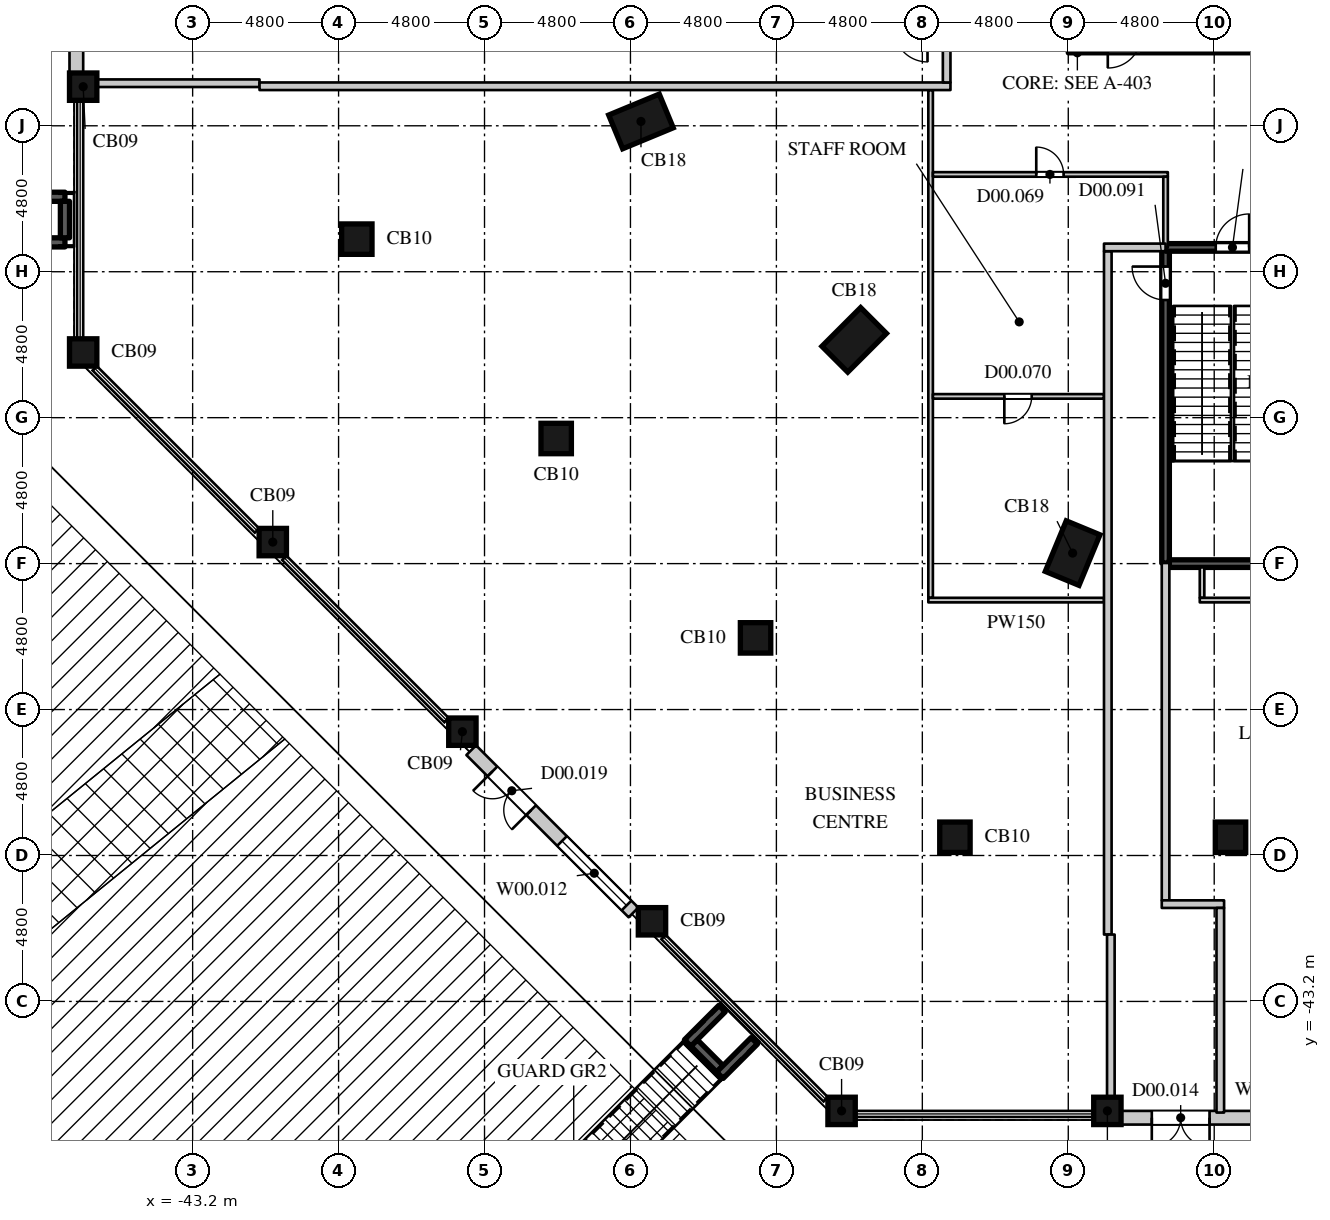
"""IFC4 building model, lengths in metres.
Left out: names, types, materials, properties, quantities, classifications, styles, units other than length and angle.
Written with IfcOpenShell. Run it as: python <this file> out.ifc"""

import sys

from ifc_helpers import new_model, si_unit, direction, frame, frame_2d, origin, origin_2d, place, context, subcontext, project, spatial, rectangle, extrude, element, fill, save


model = new_model("IFC4")
c1 = context("Model", 3, precision=1e-05, world=origin(), true_north=direction((0.0, 1.0)))
c2 = subcontext(c1, "Body", "Model", "MODEL_VIEW")
j1 = project(units=[si_unit("LENGTHUNIT", "METRE"), si_unit("PLANEANGLEUNIT", "RADIAN")], contexts=[c1])
p1 = place(None, origin())
s1 = spatial("IfcSite", under=j1, at=p1, CompositionType="ELEMENT")
p2 = place(p1, origin())
s2 = spatial("IfcBuilding", under=s1, at=p2, CompositionType="ELEMENT")
p3 = place(p2, origin())
s3 = spatial("IfcBuildingStorey", under=s2, at=p3, CompositionType="ELEMENT", Elevation=0.0)
for number, where, z_axis, x_axis in (
    (1, (-21.856, -46.8, 0.0), (0.0, 0.0, 1.0), (1.0, 0.0, 0.0)),
    (2, (-13.114, -46.8, 0.0), (0.0, 0.0, 1.0), (1.0, 0.0, 0.0)),
    (3, (-28.092, -40.564, 0.0), (0.0, 0.0, 1.0), (1.0, 0.0, 0.0)),
):
    element("IfcColumn", number, at=place(p3, frame(where, z_axis=z_axis, x_axis=x_axis)), inside=s3, PredefinedType="COLUMN", context=c2, shape_type="SweptSolid", body=[
        extrude(rectangle(XDim=0.9, YDim=0.9, at=origin_2d()), origin(), (0.0, 0.0, 1.0), 6.0),
    ])
for number, where, z_axis, x_axis in (
    (4, (-18.128, -37.8, 0.0), (0.0, 0.0, 1.0), (1.0, 0.0, 0.0)),
    (5, (-9.064, -37.8, 0.0), (0.0, 0.0, 1.0), (1.0, 0.0, 0.0)),
):
    element("IfcColumn", number, at=place(p3, frame(where, z_axis=z_axis, x_axis=x_axis)), inside=s3, PredefinedType="COLUMN", context=c2, shape_type="SweptSolid", body=[
        extrude(rectangle(XDim=1.0, YDim=1.0, at=origin_2d()), origin(), (0.0, 0.0, 1.0), 6.0),
    ])
p4 = place(p3, frame((-34.328, -34.328, 0.0), z_axis=(0.0, 0.0, 1.0), x_axis=(1.0, 0.0, 0.0)))
e6 = element("IfcColumn", 6, at=p4, inside=s3, PredefinedType="COLUMN", context=c2, shape_type="SweptSolid", body=[
    extrude(rectangle(XDim=0.9, YDim=0.9, at=origin_2d()), origin(), (0.0, 0.0, 1.0), 6.0),
])
p5 = place(p3, frame((-24.685, -31.243, 0.0), z_axis=(0.0, 0.0, 1.0), x_axis=(1.0, 0.0, 0.0)))
e7 = element("IfcColumn", 7, at=p5, inside=s3, PredefinedType="COLUMN", context=c2, shape_type="SweptSolid", body=[
    extrude(rectangle(XDim=1.0, YDim=1.0, at=origin_2d()), origin(), (0.0, 0.0, 1.0), 6.0),
])
p6 = place(p3, frame((-14.257, -28.454, 0.0), z_axis=(0.0, 0.0, 1.0), x_axis=(0.923879505795, -0.382683496864, 0.0)))
e8 = element("IfcColumn", 8, at=p6, inside=s3, PredefinedType="COLUMN", context=c2, shape_type="SweptSolid", body=[
    extrude(rectangle(XDim=1.2, YDim=1.8, at=origin_2d()), origin(), (0.0, 0.0, 1.0), 6.0),
])
p7 = place(p3, frame((-40.564, -28.092, 0.0), z_axis=(0.0, 0.0, 1.0), x_axis=(1.0, 0.0, 0.0)))
e9 = element("IfcColumn", 9, at=p7, inside=s3, PredefinedType="COLUMN", context=c2, shape_type="SweptSolid", body=[
    extrude(rectangle(XDim=0.9, YDim=0.9, at=origin_2d()), origin(), (0.0, 0.0, 1.0), 6.0),
])
p8 = place(p3, frame((-31.243, -24.685, 0.0), z_axis=(0.0, 0.0, 1.0), x_axis=(1.0, 0.0, 0.0)))
e10 = element("IfcColumn", 10, at=p8, inside=s3, PredefinedType="COLUMN", context=c2, shape_type="SweptSolid", body=[
    extrude(rectangle(XDim=1.0, YDim=1.0, at=origin_2d()), origin(), (0.0, 0.0, 1.0), 6.0),
])
p9 = place(p3, frame((-46.8, -21.856, 0.0), z_axis=(0.0, 0.0, 1.0), x_axis=(1.0, 0.0, 0.0)))
e11 = element("IfcColumn", 11, at=p9, inside=s3, PredefinedType="COLUMN", context=c2, shape_type="SweptSolid", body=[
    extrude(rectangle(XDim=0.9, YDim=0.9, at=origin_2d()), origin(), (0.0, 0.0, 1.0), 6.0),
])
p10 = place(p3, frame((-21.441, -21.441, 0.0), z_axis=(0.0, 0.0, 1.0), x_axis=(0.707106781187, -0.707106781187, 0.0)))
e12 = element("IfcColumn", 12, at=p10, inside=s3, PredefinedType="COLUMN", context=c2, shape_type="SweptSolid", body=[
    extrude(rectangle(XDim=1.2, YDim=1.8, at=origin_2d()), origin(), (0.0, 0.0, 1.0), 6.0),
])
p11 = place(p3, frame((-37.8, -18.128, 0.0), z_axis=(0.0, 0.0, 1.0), x_axis=(1.0, 0.0, 0.0)))
e13 = element("IfcColumn", 13, at=p11, inside=s3, PredefinedType="COLUMN", context=c2, shape_type="SweptSolid", body=[
    extrude(rectangle(XDim=1.0, YDim=1.0, at=origin_2d()), origin(), (0.0, 0.0, 1.0), 6.0),
])
p12 = place(p3, frame((-28.454, -14.257, 0.0), z_axis=(0.0, 0.0, 1.0), x_axis=(0.382683496864, -0.923879505795, 0.0)))
e14 = element("IfcColumn", 14, at=p12, inside=s3, PredefinedType="COLUMN", context=c2, shape_type="SweptSolid", body=[
    extrude(rectangle(XDim=1.2, YDim=1.8, at=origin_2d()), origin(), (0.0, 0.0, 1.0), 6.0),
])
p13 = place(p3, frame((-46.8, -13.114, 0.0), z_axis=(0.0, 0.0, 1.0), x_axis=(1.0, 0.0, 0.0)))
e15 = element("IfcColumn", 15, at=p13, inside=s3, PredefinedType="COLUMN", context=c2, shape_type="SweptSolid", body=[
    extrude(rectangle(XDim=0.9, YDim=0.9, at=origin_2d()), origin(), (0.0, 0.0, 1.0), 6.0),
])
p14 = place(p3, frame((-47.025, -4.821, 0.0), z_axis=(0.0, 0.0, 1.0), x_axis=(0.0, -1.0, 0.0)))
e16 = element("IfcWall", 16, at=p14, inside=s3, PredefinedType="ELEMENTEDWALL", context=c2, shape_type="SweptSolid", body=[
    extrude(rectangle(XDim=7.842, YDim=0.45, at=frame_2d((3.921, 0.0))), origin(), (0.0, 0.0, 1.0), 4.8),
])
p15 = place(p14, frame((1.061, 0.0, 0.0)))
e17 = element("IfcOpeningElement", 17, at=p15, cuts=e16, PredefinedType="OPENING", context=c2, shape_type="SweptSolid", body=[
    extrude(rectangle(XDim=1.8, YDim=2.7, at=frame_2d((0.9, 1.35))), frame((0.0, 0.235, 0.0), z_axis=(0.0, -1.0, 0.0), x_axis=(1.0, 0.0, 0.0)), (0.0, 0.0, 1.0), 0.47),
])
p16 = place(p14, frame((5.157, 0.0, 0.0)))
e18 = element("IfcOpeningElement", 18, at=p16, cuts=e16, PredefinedType="OPENING", context=c2, shape_type="SweptSolid", body=[
    extrude(rectangle(XDim=1.9, YDim=2.7, at=frame_2d((0.95, 1.35))), frame((0.0, 0.235, 0.0), z_axis=(0.0, -1.0, 0.0), x_axis=(1.0, 0.0, 0.0)), (0.0, 0.0, 1.0), 0.47),
])
p17 = place(p3, frame((-34.037, -34.937, 0.0), z_axis=(0.0, 0.0, 1.0), x_axis=(0.707122957123, -0.70709060488, 0.0)))
e19 = element("IfcWall", 19, at=p17, inside=s3, PredefinedType="ELEMENTEDWALL", context=c2, shape_type="SweptSolid", body=[
    extrude(rectangle(XDim=7.546, YDim=0.45, at=frame_2d((3.773, 0.0))), origin(), (0.0, 0.0, 1.0), 4.8),
])
p18 = place(p17, frame((0.987, 0.0, 0.0)))
e20 = element("IfcOpeningElement", 20, at=p18, cuts=e19, PredefinedType="OPENING", context=c2, shape_type="SweptSolid", body=[
    extrude(rectangle(XDim=1.8, YDim=2.7, at=frame_2d((0.9, 1.35))), frame((0.0, 0.235, 0.0), z_axis=(0.0, -1.0, 0.0), x_axis=(1.0, 0.0, 0.0)), (0.0, 0.0, 1.0), 0.47),
])
p19 = place(p17, frame((4.223, 0.0, 1.05)))
e21 = element("IfcOpeningElement", 21, at=p19, cuts=e19, PredefinedType="OPENING", context=c2, shape_type="SweptSolid", body=[
    extrude(rectangle(XDim=3.0, YDim=2.7, at=frame_2d((1.5, 1.35))), frame((0.0, 0.235, 0.0), z_axis=(0.0, -1.0, 0.0), x_axis=(1.0, 0.0, 0.0)), (0.0, 0.0, 1.0), 0.47),
])
p20 = place(p3, frame((-12.664, -47.025, 0.0), z_axis=(0.0, 0.0, 1.0), x_axis=(1.0, 0.0, 0.0)))
e22 = element("IfcWall", 22, at=p20, inside=s3, PredefinedType="ELEMENTEDWALL", context=c2, shape_type="SweptSolid", body=[
    extrude(rectangle(XDim=7.842, YDim=0.45, at=frame_2d((3.921, 0.0))), origin(), (0.0, 0.0, 1.0), 4.8),
])
p21 = place(p20, frame((1.01, 0.0, 0.0)))
e23 = element("IfcOpeningElement", 23, at=p21, cuts=e22, PredefinedType="OPENING", context=c2, shape_type="SweptSolid", body=[
    extrude(rectangle(XDim=1.9, YDim=2.7, at=frame_2d((0.95, 1.35))), frame((0.0, 0.235, 0.0), z_axis=(0.0, -1.0, 0.0), x_axis=(1.0, 0.0, 0.0)), (0.0, 0.0, 1.0), 0.47),
])
p22 = place(p20, frame((4.371, 0.0, 1.05)))
e24 = element("IfcOpeningElement", 24, at=p22, cuts=e22, PredefinedType="OPENING", context=c2, shape_type="SweptSolid", body=[
    extrude(rectangle(XDim=1.09, YDim=2.7, at=frame_2d((0.545, 1.35))), frame((0.0, 0.235, 0.0), z_axis=(0.0, -1.0, 0.0), x_axis=(1.0, 0.0, 0.0)), (0.0, 0.0, 1.0), 0.47),
])
p23 = place(p20, frame((5.864, 0.0, 1.05)))
e25 = element("IfcOpeningElement", 25, at=p23, cuts=e22, PredefinedType="OPENING", context=c2, shape_type="SweptSolid", body=[
    extrude(rectangle(XDim=1.51, YDim=2.7, at=frame_2d((0.755, 1.35))), frame((0.0, 0.235, 0.0), z_axis=(0.0, -1.0, 0.0), x_axis=(1.0, 0.0, 0.0)), (0.0, 0.0, 1.0), 0.47),
])
for number, where, z_axis, x_axis in (
    (26, (-25.787, -43.435, 0.0), (0.0, 0.0, 1.0), (-0.707, -0.707, 0.0)),
    (27, (-24.726, -44.495, 0.0), (0.0, 0.0, 1.0), (-0.707, -0.707, 0.0)),
):
    element("IfcWall", number, at=place(p3, frame(where, z_axis=z_axis, x_axis=x_axis)), inside=s3, PredefinedType="SOLIDWALL", context=c2, shape_type="SweptSolid", body=[
        extrude(rectangle(XDim=1.6, YDim=0.3, at=frame_2d((0.8, 0.0))), origin(), (0.0, 0.0, 1.0), 5.8),
    ])
p24 = place(p3, frame((-26.706, -44.566, 0.0), z_axis=(0.0, 0.0, 1.0), x_axis=(0.707208501214, -0.707005046524, 0.0)))
e28 = element("IfcWall", 28, at=p24, inside=s3, PredefinedType="SOLIDWALL", context=c2, shape_type="SweptSolid", body=[
    extrude(rectangle(XDim=1.2, YDim=0.3, at=frame_2d((0.6, 0.0))), origin(), (0.0, 0.0, 1.0), 5.8),
])
p25 = place(p3, frame((-18.928, -29.925, 0.0), z_axis=(0.0, 0.0, 1.0), x_axis=(0.0, 1.0, 0.0)))
e29 = element("IfcWall", 29, at=p25, inside=s3, PredefinedType="PARTITIONING", context=c2, shape_type="SweptSolid", body=[
    extrude(rectangle(XDim=16.7, YDim=0.15, at=frame_2d((8.35, 0.0))), origin(), (0.0, 0.0, 1.0), 5.65),
])
p26 = place(p3, frame((-19.003, -30.0, 0.0), z_axis=(0.0, 0.0, 1.0), x_axis=(1.0, 0.0, 0.0)))
e30 = element("IfcWall", 30, at=p26, inside=s3, PredefinedType="PARTITIONING", context=c2, shape_type="SweptSolid", body=[
    extrude(rectangle(XDim=5.778, YDim=0.15, at=frame_2d((2.889, 0.0))), origin(), (0.0, 0.0, 1.0), 5.65),
])
p27 = place(p3, frame((-18.853, -23.3, 0.0), z_axis=(0.0, 0.0, 1.0), x_axis=(1.0, 0.0, 0.0)))
e31 = element("IfcWall", 31, at=p27, inside=s3, PredefinedType="PARTITIONING", context=c2, shape_type="SweptSolid", body=[
    extrude(rectangle(XDim=5.628, YDim=0.15, at=frame_2d((2.814, 0.0))), origin(), (0.0, 0.0, 1.0), 5.65),
])
p28 = place(p27, frame((2.35, 0.0, 0.0)))
e32 = element("IfcOpeningElement", 32, at=p28, cuts=e31, PredefinedType="OPENING", context=c2, shape_type="SweptSolid", body=[
    extrude(rectangle(XDim=0.9, YDim=2.2, at=frame_2d((0.45, 1.1))), frame((0.0, 0.085, 0.0), z_axis=(0.0, -1.0, 0.0), x_axis=(1.0, 0.0, 0.0)), (0.0, 0.0, 1.0), 0.17),
])
p29 = place(p3, frame((-18.853, -16.0, 0.0), z_axis=(0.0, 0.0, 1.0), x_axis=(1.0, 0.0, 0.0)))
e33 = element("IfcWall", 33, at=p29, inside=s3, PredefinedType="PARTITIONING", context=c2, shape_type="SweptSolid", body=[
    extrude(rectangle(XDim=7.728, YDim=0.15, at=frame_2d((3.864, 0.0))), origin(), (0.0, 0.0, 1.0), 5.65),
])
p30 = place(p29, frame((3.4, 0.0, 0.0)))
e34 = element("IfcOpeningElement", 34, at=p30, cuts=e33, PredefinedType="OPENING", context=c2, shape_type="SweptSolid", body=[
    extrude(rectangle(XDim=0.9, YDim=2.2, at=frame_2d((0.45, 1.1))), frame((0.0, 0.085, 0.0), z_axis=(0.0, -1.0, 0.0), x_axis=(1.0, 0.0, 0.0)), (0.0, 0.0, 1.0), 0.17),
])
p31 = place(p3, frame((-11.2, -18.4, 0.0), z_axis=(0.0, 0.0, 1.0), x_axis=(0.0, 1.0, 0.0)))
e35 = element("IfcWall", 35, at=p31, inside=s3, PredefinedType="PARTITIONING", context=c2, shape_type="SweptSolid", body=[
    extrude(rectangle(XDim=2.325, YDim=0.15, at=frame_2d((1.163, 0.0))), origin(), (0.0, 0.0, 1.0), 5.65),
])
p32 = place(p3, frame((-10.0, -29.925, 0.0), z_axis=(0.0, 0.0, 1.0), x_axis=(0.0, 1.0, 0.0)))
e36 = element("IfcWall", 36, at=p32, inside=s3, PredefinedType="PARTITIONING", context=c2, shape_type="SweptSolid", body=[
    extrude(rectangle(XDim=1.0, YDim=0.15, at=frame_2d((0.5, 0.0))), origin(), (0.0, 0.0, 1.0), 5.65),
])
p33 = place(p3, frame((-10.075, -30.0, 0.0), z_axis=(0.0, 0.0, 1.0), x_axis=(1.0, 0.0, 0.0)))
e37 = element("IfcWall", 37, at=p33, inside=s3, PredefinedType="PARTITIONING", context=c2, shape_type="SweptSolid", body=[
    extrude(rectangle(XDim=7.675, YDim=0.15, at=frame_2d((3.837, 0.0))), origin(), (0.0, 0.0, 1.0), 5.65),
])
p34 = place(p3, frame((-11.2, -28.78, 0.0), z_axis=(0.0, 0.0, 1.0), x_axis=(0.0, 1.0, 0.0)))
e38 = element("IfcWall", 38, at=p34, inside=s3, PredefinedType="SHEAR", context=c2, shape_type="SweptSolid", body=[
    extrude(rectangle(XDim=10.38, YDim=0.25, at=frame_2d((5.19, 0.0))), origin(), (0.0, 0.0, 1.0), 5.65),
])
p35 = place(p34, frame((8.65, 0.0, 0.0)))
e39 = element("IfcOpeningElement", 39, at=p35, cuts=e38, PredefinedType="OPENING", context=c2, shape_type="SweptSolid", body=[
    extrude(rectangle(XDim=1.1, YDim=2.2, at=frame_2d((0.55, 1.1))), frame((0.0, 0.135, 0.0), z_axis=(0.0, -1.0, 0.0), x_axis=(1.0, 0.0, 0.0)), (0.0, 0.0, 1.0), 0.27),
])
p36 = place(p3, frame((-11.075, -28.8, 0.0), z_axis=(0.0, 0.0, 1.0), x_axis=(1.0, 0.0, 0.0)))
e40 = element("IfcWall", 40, at=p36, inside=s3, PredefinedType="SHEAR", context=c2, shape_type="SweptSolid", body=[
    extrude(rectangle(XDim=4.4, YDim=0.25, at=frame_2d((2.2, 0.0))), origin(), (0.0, 0.0, 1.0), 5.65),
])
p37 = place(p3, frame((-11.2, -18.4, 0.0), z_axis=(0.0, 0.0, 1.0), x_axis=(1.0, 0.0, 0.0)))
e41 = element("IfcWall", 41, at=p37, inside=s3, PredefinedType="SHEAR", context=c2, shape_type="SweptSolid", body=[
    extrude(rectangle(XDim=4.275, YDim=0.25, at=frame_2d((2.137, 0.0))), origin(), (0.0, 0.0, 1.0), 5.65),
])
p38 = place(p37, frame((1.65, 0.0, 0.0)))
e42 = element("IfcOpeningElement", 42, at=p38, cuts=e41, PredefinedType="OPENING", context=c2, shape_type="SweptSolid", body=[
    extrude(rectangle(XDim=1.1, YDim=2.2, at=frame_2d((0.55, 1.1))), frame((0.0, 0.135, 0.0), z_axis=(0.0, -1.0, 0.0), x_axis=(1.0, 0.0, 0.0)), (0.0, 0.0, 1.0), 0.27),
])
p39 = place(p3, frame((-46.35, -13.0, 0.0), z_axis=(0.0, 0.0, 1.0), x_axis=(1.0, 0.0, 0.0)))
e43 = element("IfcWall", 43, at=p39, inside=s3, PredefinedType="PARTITIONING", context=c2, shape_type="SweptSolid", body=[
    extrude(rectangle(XDim=5.35, YDim=0.25, at=frame_2d((2.675, 0.0))), origin(), (0.0, 0.0, 1.0), 5.65),
])
p40 = place(p3, frame((-41.0, -13.1, 0.0), z_axis=(0.0, 0.0, 1.0), x_axis=(1.0, 0.0, 0.0)))
e44 = element("IfcWall", 44, at=p40, inside=s3, PredefinedType="PARTITIONING", context=c2, shape_type="SweptSolid", body=[
    extrude(rectangle(XDim=22.725, YDim=0.25, at=frame_2d((11.363, 0.0))), origin(), (0.0, 0.0, 1.0), 5.65),
])
p41 = place(p3, frame((-18.4, -12.975, 0.0), z_axis=(0.0, 0.0, 1.0), x_axis=(0.0, 1.0, 0.0)))
e45 = element("IfcWall", 45, at=p41, inside=s3, PredefinedType="PARTITIONING", context=c2, shape_type="SweptSolid", body=[
    extrude(rectangle(XDim=1.775, YDim=0.25, at=frame_2d((0.888, 0.0))), origin(), (0.0, 0.0, 1.0), 5.65),
])
p42 = place(p3, frame((-13.1, -41.0, 0.0), z_axis=(0.0, 0.0, 1.0), x_axis=(0.0, 1.0, 0.0)))
e46 = element("IfcWall", 46, at=p42, inside=s3, PredefinedType="PARTITIONING", context=c2, shape_type="SweptSolid", body=[
    extrude(rectangle(XDim=22.475, YDim=0.25, at=frame_2d((11.238, 0.0))), origin(), (0.0, 0.0, 1.0), 5.65),
])
p43 = place(p3, frame((-13.225, -18.4, 0.0), z_axis=(0.0, 0.0, 1.0), x_axis=(1.0, 0.0, 0.0)))
e47 = element("IfcWall", 47, at=p43, inside=s3, PredefinedType="PARTITIONING", context=c2, shape_type="SweptSolid", body=[
    extrude(rectangle(XDim=2.025, YDim=0.25, at=frame_2d((1.013, 0.0))), origin(), (0.0, 0.0, 1.0), 5.65),
])
p44 = place(p3, frame((-13.0, -46.35, 0.0), z_axis=(0.0, 0.0, 1.0), x_axis=(0.0, 1.0, 0.0)))
e48 = element("IfcWall", 48, at=p44, inside=s3, PredefinedType="PARTITIONING", context=c2, shape_type="SweptSolid", body=[
    extrude(rectangle(XDim=5.35, YDim=0.25, at=frame_2d((2.675, 0.0))), origin(), (0.0, 0.0, 1.0), 5.65),
])
p45 = place(p3, frame((-11.2, -39.875, 0.0), z_axis=(0.0, 0.0, 1.0), x_axis=(0.0, 1.0, 0.0)))
e49 = element("IfcWall", 49, at=p45, inside=s3, PredefinedType="PARTITIONING", context=c2, shape_type="SweptSolid", body=[
    extrude(rectangle(XDim=11.095, YDim=0.25, at=frame_2d((5.547, 0.0))), origin(), (0.0, 0.0, 1.0), 5.65),
])
p46 = place(p3, frame((-11.325, -40.0, 0.0), z_axis=(0.0, 0.0, 1.0), x_axis=(1.0, 0.0, 0.0)))
e50 = element("IfcWall", 50, at=p46, inside=s3, PredefinedType="PARTITIONING", context=c2, shape_type="SweptSolid", body=[
    extrude(rectangle(XDim=2.05, YDim=0.25, at=frame_2d((1.025, 0.0))), origin(), (0.0, 0.0, 1.0), 5.65),
])
p47 = place(p3, frame((-9.4, -46.855, 0.0), z_axis=(0.0, 0.0, 1.0), x_axis=(0.0, 1.0, 0.0)))
e51 = element("IfcWall", 51, at=p47, inside=s3, PredefinedType="PARTITIONING", context=c2, shape_type="SweptSolid", body=[
    extrude(rectangle(XDim=6.73, YDim=0.25, at=frame_2d((3.365, 0.0))), origin(), (0.0, 0.0, 1.0), 5.65),
])
for number, where, z_axis, x_axis in (
    (52, (-47.4, -16.735, 0.0), (0.0, 0.0, 1.0), (-1.0, 0.0, 0.0)),
    (53, (-47.4, -18.235, 0.0), (0.0, 0.0, 1.0), (-1.0, 0.0, 0.0)),
):
    element("IfcWall", number, at=place(p3, frame(where, z_axis=z_axis, x_axis=x_axis)), inside=s3, PredefinedType="SOLIDWALL", context=c2, shape_type="SweptSolid", body=[
        extrude(rectangle(XDim=1.35, YDim=0.3, at=frame_2d((0.675, 0.0))), origin(), (0.0, 0.0, 1.0), 5.8),
    ])
p48 = place(p3, frame((-47.4, -16.885, 0.0), z_axis=(0.0, 0.0, 1.0), x_axis=(0.0, -1.0, 0.0)))
e54 = element("IfcWall", 54, at=p48, inside=s3, PredefinedType="SOLIDWALL", context=c2, shape_type="SweptSolid", body=[
    extrude(rectangle(XDim=1.2, YDim=0.3, at=frame_2d((0.6, 0.0))), origin(), (0.0, 0.0, 1.0), 5.8),
])
p49 = place(p18, frame((1.8, 0.0, 0.0), z_axis=(0.0, 0.0, 1.0), x_axis=(-1.0, 0.0, 0.0)))
e55 = element("IfcDoor", 55, at=p49, inside=s3, OperationType="DOUBLE_DOOR_SINGLE_SWING", PredefinedType="DOOR", context=c2, shape_type="SweptSolid", body=[
    extrude(rectangle(XDim=1.8, YDim=2.7, at=frame_2d((0.9, 1.35))), frame((0.0, -0.08, 0.0), z_axis=(0.0, -1.0, 0.0), x_axis=(1.0, 0.0, 0.0)), (0.0, 0.0, 1.0), 0.05),
])
fill(e20, e55)
p50 = place(p19, origin())
e56 = element("IfcWindow", 56, at=p50, inside=s3, PartitioningType="SINGLE_PANEL", PredefinedType="WINDOW", context=c2, shape_type="SweptSolid", body=[
    extrude(rectangle(XDim=3.0, YDim=2.7, at=frame_2d((1.5, 1.35))), frame((0.0, 0.135, 0.0), z_axis=(0.0, -1.0, 0.0), x_axis=(1.0, 0.0, 0.0)), (0.0, 0.0, 1.0), 0.06),
])
fill(e21, e56)
p51 = place(p21, frame((1.9, 0.0, 0.0), z_axis=(0.0, 0.0, 1.0), x_axis=(-1.0, 0.0, 0.0)))
e57 = element("IfcDoor", 57, at=p51, inside=s3, OperationType="DOUBLE_DOOR_SINGLE_SWING", PredefinedType="DOOR", context=c2, shape_type="SweptSolid", body=[
    extrude(rectangle(XDim=1.9, YDim=2.7, at=frame_2d((0.95, 1.35))), frame((0.0, -0.08, 0.0), z_axis=(0.0, -1.0, 0.0), x_axis=(1.0, 0.0, 0.0)), (0.0, 0.0, 1.0), 0.05),
])
fill(e23, e57)
p52 = place(p30, origin())
e58 = element("IfcDoor", 58, at=p52, inside=s3, OperationType="SINGLE_SWING_LEFT", PredefinedType="DOOR", context=c2, shape_type="SweptSolid", body=[
    extrude(rectangle(XDim=0.9, YDim=2.2, at=frame_2d((0.45, 1.1))), frame((0.0, 0.025, 0.0), z_axis=(0.0, -1.0, 0.0), x_axis=(1.0, 0.0, 0.0)), (0.0, 0.0, 1.0), 0.05),
])
fill(e34, e58)
p53 = place(p28, origin())
e59 = element("IfcDoor", 59, at=p53, inside=s3, OperationType="SINGLE_SWING_RIGHT", PredefinedType="DOOR", context=c2, shape_type="SweptSolid", body=[
    extrude(rectangle(XDim=0.9, YDim=2.2, at=frame_2d((0.45, 1.1))), frame((0.0, 0.025, 0.0), z_axis=(0.0, -1.0, 0.0), x_axis=(1.0, 0.0, 0.0)), (0.0, 0.0, 1.0), 0.05),
])
fill(e32, e59)
p54 = place(p38, origin())
e60 = element("IfcDoor", 60, at=p54, inside=s3, OperationType="SINGLE_SWING_RIGHT", PredefinedType="DOOR", context=c2, shape_type="SweptSolid", body=[
    extrude(rectangle(XDim=1.1, YDim=2.2, at=frame_2d((0.55, 1.1))), frame((0.0, 0.025, 0.0), z_axis=(0.0, -1.0, 0.0), x_axis=(1.0, 0.0, 0.0)), (0.0, 0.0, 1.0), 0.05),
])
fill(e42, e60)
p55 = place(p35, origin())
e61 = element("IfcDoor", 61, at=p55, inside=s3, OperationType="SINGLE_SWING_RIGHT", PredefinedType="DOOR", context=c2, shape_type="SweptSolid", body=[
    extrude(rectangle(XDim=1.1, YDim=2.2, at=frame_2d((0.55, 1.1))), frame((0.0, 0.025, 0.0), z_axis=(0.0, -1.0, 0.0), x_axis=(1.0, 0.0, 0.0)), (0.0, 0.0, 1.0), 0.05),
])
fill(e39, e61)
save(model, sys.argv[1])
